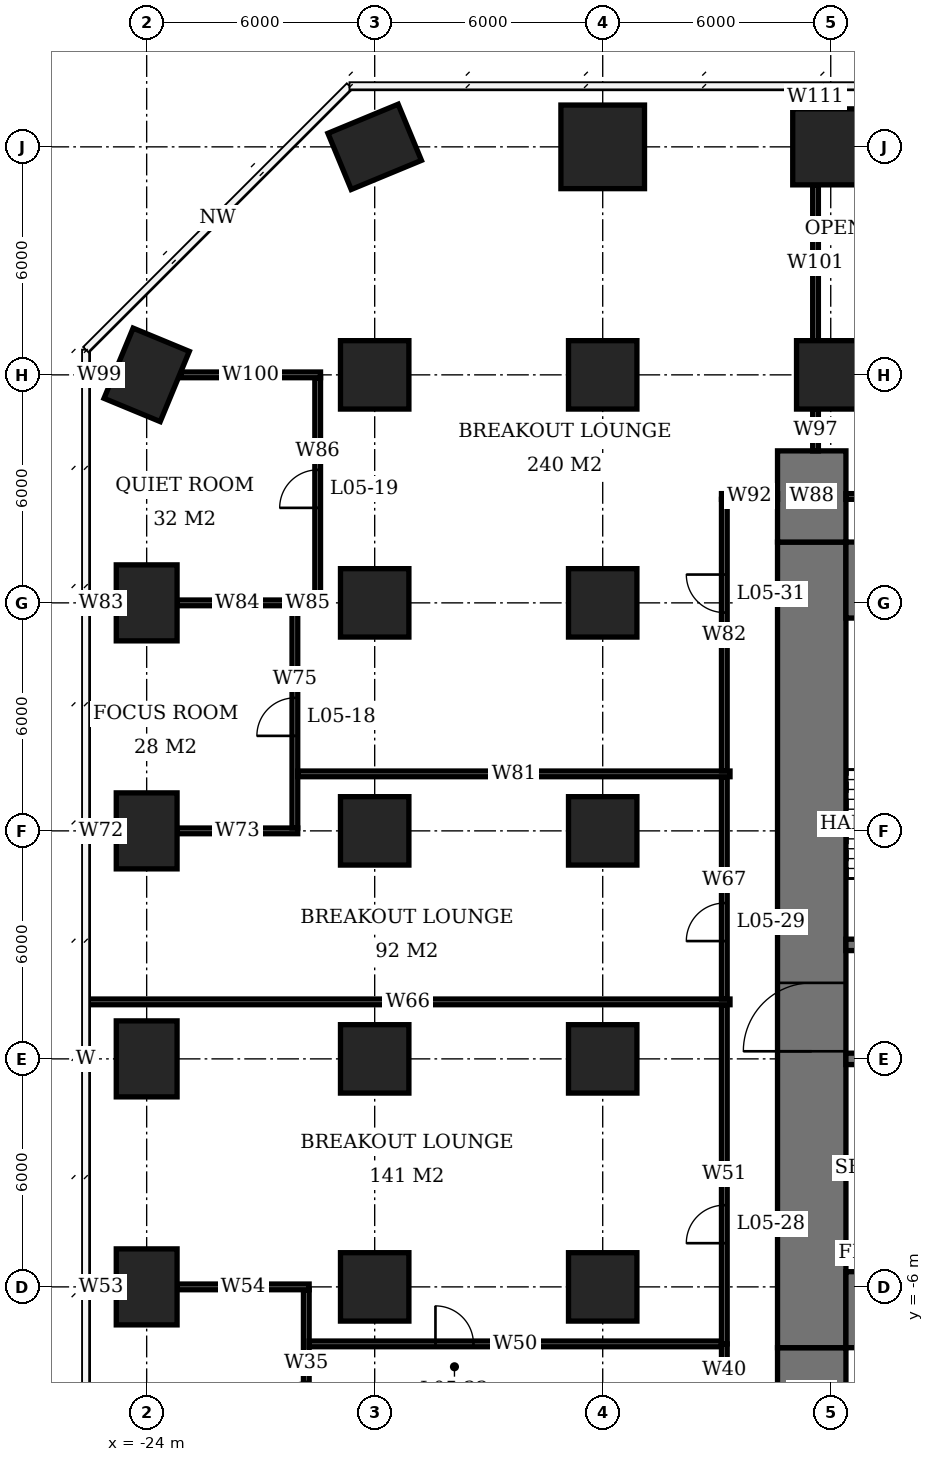
"""IFC4 building model, lengths in metres.
Left out: names, types, materials, properties, quantities, classifications, styles, units other than length and angle.
Written with IfcOpenShell. Run it as: python <this file> out.ifc"""

import sys

from ifc_helpers import new_model, si_unit, direction, frame, frame_2d, origin, origin_2d, place, context, subcontext, project, spatial, rectangle, extrude, element, fill, save


model = new_model("IFC4")
c1 = context("Model", 3, precision=1e-05, world=origin(), true_north=direction((0.0, 1.0)))
c2 = subcontext(c1, "Body", "Model", "MODEL_VIEW")
j1 = project(units=[si_unit("LENGTHUNIT", "METRE"), si_unit("PLANEANGLEUNIT", "RADIAN")], contexts=[c1])
p1 = place(None, origin())
s1 = spatial("IfcSite", under=j1, at=p1, CompositionType="ELEMENT")
p2 = place(p1, origin())
s2 = spatial("IfcBuilding", under=s1, at=p2, CompositionType="ELEMENT")
p3 = place(p2, frame((0.0, 0.0, 26.0)))
s3 = spatial("IfcBuildingStorey", under=s2, at=p3, CompositionType="ELEMENT", Elevation=26.0)
for number, where, z_axis, x_axis in (
    (1, (-24.0, -6.0, 0.0), (0.0, 0.0, 1.0), (0.0, 1.0, 0.0)),
    (2, (-24.0, 0.0, 0.0), (0.0, 0.0, 1.0), (0.0, 1.0, 0.0)),
    (3, (-24.0, 6.0, 0.0), (0.0, 0.0, 1.0), (0.0, 1.0, 0.0)),
    (4, (-24.0, 12.0, 0.0), (0.0, 0.0, 1.0), (0.0, 1.0, 0.0)),
    (5, (-24.0, 18.0, 0.0), (0.0, 0.0, 1.0), (0.383, 0.924, 0.0)),
):
    element("IfcColumn", number, at=place(p3, frame(where, z_axis=z_axis, x_axis=x_axis)), inside=s3, PredefinedType="COLUMN", context=c2, shape_type="SweptSolid", body=[
        extrude(rectangle(XDim=2.0, YDim=1.6, at=origin_2d()), origin(), (0.0, 0.0, 1.0), 3.9),
    ])
for number, where, z_axis, x_axis in (
    (6, (-18.0, -6.0, 0.0), (0.0, 0.0, 1.0), (1.0, 0.0, 0.0)),
    (7, (-18.0, 0.0, 0.0), (0.0, 0.0, 1.0), (1.0, 0.0, 0.0)),
    (8, (-18.0, 6.0, 0.0), (0.0, 0.0, 1.0), (1.0, 0.0, 0.0)),
    (9, (-18.0, 12.0, 0.0), (0.0, 0.0, 1.0), (1.0, 0.0, 0.0)),
    (10, (-18.0, 18.0, 0.0), (0.0, 0.0, 1.0), (1.0, 0.0, 0.0)),
):
    element("IfcColumn", number, at=place(p3, frame(where, z_axis=z_axis, x_axis=x_axis)), inside=s3, PredefinedType="COLUMN", context=c2, shape_type="SweptSolid", body=[
        extrude(rectangle(XDim=1.8, YDim=1.8, at=origin_2d()), origin(), (0.0, 0.0, 1.0), 3.9),
    ])
p4 = place(p3, frame((-18.0, 24.0, 0.0), z_axis=(0.0, 0.0, 1.0), x_axis=(0.923879532511, 0.382683432365, 0.0)))
e11 = element("IfcColumn", 11, at=p4, inside=s3, PredefinedType="COLUMN", context=c2, shape_type="SweptSolid", body=[
    extrude(rectangle(XDim=2.0, YDim=1.6, at=origin_2d()), origin(), (0.0, 0.0, 1.0), 3.9),
])
for number, where, z_axis, x_axis in (
    (12, (-12.0, -6.0, 0.0), (0.0, 0.0, 1.0), (1.0, 0.0, 0.0)),
    (13, (-12.0, 0.0, 0.0), (0.0, 0.0, 1.0), (1.0, 0.0, 0.0)),
    (14, (-12.0, 6.0, 0.0), (0.0, 0.0, 1.0), (1.0, 0.0, 0.0)),
    (15, (-12.0, 12.0, 0.0), (0.0, 0.0, 1.0), (1.0, 0.0, 0.0)),
    (16, (-12.0, 18.0, 0.0), (0.0, 0.0, 1.0), (1.0, 0.0, 0.0)),
):
    element("IfcColumn", number, at=place(p3, frame(where, z_axis=z_axis, x_axis=x_axis)), inside=s3, PredefinedType="COLUMN", context=c2, shape_type="SweptSolid", body=[
        extrude(rectangle(XDim=1.8, YDim=1.8, at=origin_2d()), origin(), (0.0, 0.0, 1.0), 3.9),
    ])
p5 = place(p3, frame((-12.0, 24.0, 0.0), z_axis=(0.0, 0.0, 1.0), x_axis=(1.0, 0.0, 0.0)))
e17 = element("IfcColumn", 17, at=p5, inside=s3, PredefinedType="COLUMN", context=c2, shape_type="SweptSolid", body=[
    extrude(rectangle(XDim=2.2, YDim=2.2, at=origin_2d()), origin(), (0.0, 0.0, 1.0), 3.9),
])
p6 = place(p3, frame((-6.0, 18.0, 0.0), z_axis=(0.0, 0.0, 1.0), x_axis=(1.0, 0.0, 0.0)))
e18 = element("IfcColumn", 18, at=p6, inside=s3, PredefinedType="COLUMN", context=c2, shape_type="SweptSolid", body=[
    extrude(rectangle(XDim=1.8, YDim=1.8, at=origin_2d()), origin(), (0.0, 0.0, 1.0), 3.9),
])
p7 = place(p3, frame((-6.0, 24.0, 0.0), z_axis=(0.0, 0.0, 1.0), x_axis=(1.0, 0.0, 0.0)))
e19 = element("IfcColumn", 19, at=p7, inside=s3, PredefinedType="COLUMN", context=c2, shape_type="SweptSolid", body=[
    extrude(rectangle(XDim=2.0, YDim=2.0, at=origin_2d()), origin(), (0.0, 0.0, 1.0), 3.9),
])
for number, where, z_axis, x_axis in (
    (20, (-5.6, -6.6, 0.0), (0.0, 0.0, 1.0), (1.0, 0.0, 0.0)),
    (21, (-5.6, 12.6, 0.0), (0.0, 0.0, 1.0), (1.0, 0.0, 0.0)),
):
    element("IfcWall", number, at=place(p3, frame(where, z_axis=z_axis, x_axis=x_axis)), inside=s3, PredefinedType="SHEAR", context=c2, shape_type="SweptSolid", body=[
        extrude(rectangle(XDim=23.2, YDim=2.0, at=frame_2d((11.6, 0.0))), origin(), (0.0, 0.0, 1.0), 3.9),
    ])
p8 = place(p3, frame((-6.5, -7.6, 0.0), z_axis=(0.0, 0.0, 1.0), x_axis=(0.0, 1.0, 0.0)))
e22 = element("IfcWall", 22, at=p8, inside=s3, PredefinedType="SHEAR", context=c2, shape_type="SweptSolid", body=[
    extrude(rectangle(XDim=21.2, YDim=1.8, at=frame_2d((10.6, 0.0))), origin(), (0.0, 0.0, 1.0), 3.9),
])
p9 = place(p8, frame((7.8, 0.0, 0.0)))
e23 = element("IfcOpeningElement", 23, at=p9, cuts=e22, PredefinedType="OPENING", context=c2, shape_type="SweptSolid", body=[
    extrude(rectangle(XDim=1.8, YDim=2.4, at=frame_2d((0.9, 1.2))), frame((0.0, 0.91, 0.0), z_axis=(0.0, -1.0, 0.0), x_axis=(1.0, 0.0, 0.0)), (0.0, 0.0, 1.0), 1.82),
])
for number, where, z_axis, x_axis in (
    (24, (-6.5, -10.0, 0.0), (0.0, 0.0, 1.0), (0.0, 1.0, 0.0)),
    (25, (-6.5, 13.6, 0.0), (0.0, 0.0, 1.0), (0.0, 1.0, 0.0)),
):
    element("IfcWall", number, at=place(p3, frame(where, z_axis=z_axis, x_axis=x_axis)), inside=s3, PredefinedType="SHEAR", context=c2, shape_type="SweptSolid", body=[
        extrude(rectangle(XDim=2.4, YDim=1.8, at=frame_2d((1.2, 0.0))), origin(), (0.0, 0.0, 1.0), 3.9),
    ])
p10 = place(p3, frame((-5.6, 0.0, 0.0), z_axis=(0.0, 0.0, 1.0), x_axis=(1.0, 0.0, 0.0)))
e26 = element("IfcWall", 26, at=p10, inside=s3, PredefinedType="SHEAR", context=c2, shape_type="SweptSolid", body=[
    extrude(rectangle(XDim=17.75, YDim=0.3, at=frame_2d((8.875, 0.0))), origin(), (0.0, 0.0, 1.0), 3.9),
])
p11 = place(p10, frame((0.6, 0.0, 0.0)))
e27 = element("IfcOpeningElement", 27, at=p11, cuts=e26, PredefinedType="OPENING", context=c2, shape_type="SweptSolid", body=[
    extrude(rectangle(XDim=0.9, YDim=2.1, at=frame_2d((0.45, 1.05))), frame((0.0, 0.16, 0.0), z_axis=(0.0, -1.0, 0.0), x_axis=(1.0, 0.0, 0.0)), (0.0, 0.0, 1.0), 0.32),
])
p12 = place(p10, frame((3.7, 0.0, 0.0)))
e28 = element("IfcOpeningElement", 28, at=p12, cuts=e26, PredefinedType="OPENING", context=c2, shape_type="SweptSolid", body=[
    extrude(rectangle(XDim=0.9, YDim=2.1, at=frame_2d((0.45, 1.05))), frame((0.0, 0.16, 0.0), z_axis=(0.0, -1.0, 0.0), x_axis=(1.0, 0.0, 0.0)), (0.0, 0.0, 1.0), 0.32),
])
p13 = place(p3, frame((-5.6, 3.0, 0.0), z_axis=(0.0, 0.0, 1.0), x_axis=(1.0, 0.0, 0.0)))
e29 = element("IfcWall", 29, at=p13, inside=s3, PredefinedType="SHEAR", context=c2, shape_type="SweptSolid", body=[
    extrude(rectangle(XDim=5.45, YDim=0.3, at=frame_2d((2.725, 0.0))), origin(), (0.0, 0.0, 1.0), 3.9),
])
p14 = place(p13, frame((0.4, 0.0, 0.0)))
e30 = element("IfcOpeningElement", 30, at=p14, cuts=e29, PredefinedType="OPENING", context=c2, shape_type="SweptSolid", body=[
    extrude(rectangle(XDim=1.2, YDim=2.1, at=frame_2d((0.6, 1.05))), frame((0.0, 0.16, 0.0), z_axis=(0.0, -1.0, 0.0), x_axis=(1.0, 0.0, 0.0)), (0.0, 0.0, 1.0), 0.32),
])
p15 = place(p13, frame((3.95, 0.0, 0.0)))
e31 = element("IfcOpeningElement", 31, at=p15, cuts=e29, PredefinedType="OPENING", context=c2, shape_type="SweptSolid", body=[
    extrude(rectangle(XDim=0.9, YDim=2.1, at=frame_2d((0.45, 1.05))), frame((0.0, 0.16, 0.0), z_axis=(0.0, -1.0, 0.0), x_axis=(1.0, 0.0, 0.0)), (0.0, 0.0, 1.0), 0.32),
])
p16 = place(p3, frame((-25.6, -6.0, 0.0), z_axis=(0.0, 0.0, 1.0), x_axis=(1.0, 0.0, 0.0)))
e32 = element("IfcWall", 32, at=p16, inside=s3, PredefinedType="PARTITIONING", context=c2, shape_type="SweptSolid", body=[
    extrude(rectangle(XDim=0.8, YDim=0.15, at=frame_2d((0.4, 0.0))), origin(), (0.0, 0.0, 1.0), 3.65),
])
p17 = place(p3, frame((-23.2, -6.0, 0.0), z_axis=(0.0, 0.0, 1.0), x_axis=(1.0, 0.0, 0.0)))
e33 = element("IfcWall", 33, at=p17, inside=s3, PredefinedType="PARTITIONING", context=c2, shape_type="SweptSolid", body=[
    extrude(rectangle(XDim=3.475, YDim=0.15, at=frame_2d((1.737, 0.0))), origin(), (0.0, 0.0, 1.0), 3.65),
])
p18 = place(p3, frame((-25.6, 6.0, 0.0), z_axis=(0.0, 0.0, 1.0), x_axis=(1.0, 0.0, 0.0)))
e34 = element("IfcWall", 34, at=p18, inside=s3, PredefinedType="PARTITIONING", context=c2, shape_type="SweptSolid", body=[
    extrude(rectangle(XDim=0.8, YDim=0.15, at=frame_2d((0.4, 0.0))), origin(), (0.0, 0.0, 1.0), 3.65),
])
p19 = place(p3, frame((-23.2, 6.0, 0.0), z_axis=(0.0, 0.0, 1.0), x_axis=(1.0, 0.0, 0.0)))
e35 = element("IfcWall", 35, at=p19, inside=s3, PredefinedType="PARTITIONING", context=c2, shape_type="SweptSolid", body=[
    extrude(rectangle(XDim=3.175, YDim=0.15, at=frame_2d((1.587, 0.0))), origin(), (0.0, 0.0, 1.0), 3.65),
])
p20 = place(p3, frame((-25.6, 12.0, 0.0), z_axis=(0.0, 0.0, 1.0), x_axis=(1.0, 0.0, 0.0)))
e36 = element("IfcWall", 36, at=p20, inside=s3, PredefinedType="PARTITIONING", context=c2, shape_type="SweptSolid", body=[
    extrude(rectangle(XDim=0.8, YDim=0.15, at=frame_2d((0.4, 0.0))), origin(), (0.0, 0.0, 1.0), 3.65),
])
p21 = place(p3, frame((-23.2, 12.0, 0.0), z_axis=(0.0, 0.0, 1.0), x_axis=(1.0, 0.0, 0.0)))
e37 = element("IfcWall", 37, at=p21, inside=s3, PredefinedType="PARTITIONING", context=c2, shape_type="SweptSolid", body=[
    extrude(rectangle(XDim=3.175, YDim=0.15, at=frame_2d((1.587, 0.0))), origin(), (0.0, 0.0, 1.0), 3.65),
])
p22 = place(p3, frame((-20.1, 12.0, 0.0), z_axis=(0.0, 0.0, 1.0), x_axis=(1.0, 0.0, 0.0)))
e38 = element("IfcWall", 38, at=p22, inside=s3, PredefinedType="PARTITIONING", context=c2, shape_type="SweptSolid", body=[
    extrude(rectangle(XDim=0.675, YDim=0.15, at=frame_2d((0.337, 0.0))), origin(), (0.0, 0.0, 1.0), 3.65),
])
p23 = place(p3, frame((-25.6, 18.0, 0.0), z_axis=(0.0, 0.0, 1.0), x_axis=(1.0, 0.0, 0.0)))
e39 = element("IfcWall", 39, at=p23, inside=s3, PredefinedType="PARTITIONING", context=c2, shape_type="SweptSolid", body=[
    extrude(rectangle(XDim=0.703, YDim=0.15, at=frame_2d((0.352, 0.0))), origin(), (0.0, 0.0, 1.0), 3.65),
])
p24 = place(p3, frame((-23.103, 18.0, 0.0), z_axis=(0.0, 0.0, 1.0), x_axis=(1.0, 0.0, 0.0)))
e40 = element("IfcWall", 40, at=p24, inside=s3, PredefinedType="PARTITIONING", context=c2, shape_type="SweptSolid", body=[
    extrude(rectangle(XDim=3.678, YDim=0.15, at=frame_2d((1.839, 0.0))), origin(), (0.0, 0.0, 1.0), 3.65),
])
p25 = place(p3, frame((-20.1, 6.075, 0.0), z_axis=(0.0, 0.0, 1.0), x_axis=(0.0, 1.0, 0.0)))
e41 = element("IfcWall", 41, at=p25, inside=s3, PredefinedType="PARTITIONING", context=c2, shape_type="SweptSolid", body=[
    extrude(rectangle(XDim=5.85, YDim=0.15, at=frame_2d((2.925, 0.0))), origin(), (0.0, 0.0, 1.0), 3.65),
])
p26 = place(p25, frame((2.425, 0.0, 0.0)))
e42 = element("IfcOpeningElement", 42, at=p26, cuts=e41, PredefinedType="OPENING", context=c2, shape_type="SweptSolid", body=[
    extrude(rectangle(XDim=1.0, YDim=2.1, at=frame_2d((0.5, 1.05))), frame((0.0, 0.085, 0.0), z_axis=(0.0, -1.0, 0.0), x_axis=(1.0, 0.0, 0.0)), (0.0, 0.0, 1.0), 0.17),
])
p27 = place(p3, frame((-19.8, -11.925, 0.0), z_axis=(0.0, 0.0, 1.0), x_axis=(0.0, 1.0, 0.0)))
e43 = element("IfcWall", 43, at=p27, inside=s3, PredefinedType="PARTITIONING", context=c2, shape_type="SweptSolid", body=[
    extrude(rectangle(XDim=5.85, YDim=0.15, at=frame_2d((2.925, 0.0))), origin(), (0.0, 0.0, 1.0), 3.65),
])
p28 = place(p27, frame((2.425, 0.0, 0.0)))
e44 = element("IfcOpeningElement", 44, at=p28, cuts=e43, PredefinedType="OPENING", context=c2, shape_type="SweptSolid", body=[
    extrude(rectangle(XDim=1.0, YDim=2.1, at=frame_2d((0.5, 1.05))), frame((0.0, 0.085, 0.0), z_axis=(0.0, -1.0, 0.0), x_axis=(1.0, 0.0, 0.0)), (0.0, 0.0, 1.0), 0.17),
])
p29 = place(p3, frame((-19.5, 12.075, 0.0), z_axis=(0.0, 0.0, 1.0), x_axis=(0.0, 1.0, 0.0)))
e45 = element("IfcWall", 45, at=p29, inside=s3, PredefinedType="PARTITIONING", context=c2, shape_type="SweptSolid", body=[
    extrude(rectangle(XDim=5.85, YDim=0.15, at=frame_2d((2.925, 0.0))), origin(), (0.0, 0.0, 1.0), 3.65),
])
p30 = place(p29, frame((2.425, 0.0, 0.0)))
e46 = element("IfcOpeningElement", 46, at=p30, cuts=e45, PredefinedType="OPENING", context=c2, shape_type="SweptSolid", body=[
    extrude(rectangle(XDim=1.0, YDim=2.1, at=frame_2d((0.5, 1.05))), frame((0.0, 0.085, 0.0), z_axis=(0.0, -1.0, 0.0), x_axis=(1.0, 0.0, 0.0)), (0.0, 0.0, 1.0), 0.17),
])
p31 = place(p3, frame((-25.6, 1.5, 0.0), z_axis=(0.0, 0.0, 1.0), x_axis=(1.0, 0.0, 0.0)))
e47 = element("IfcWall", 47, at=p31, inside=s3, PredefinedType="PARTITIONING", context=c2, shape_type="SweptSolid", body=[
    extrude(rectangle(XDim=16.95, YDim=0.15, at=frame_2d((8.475, 0.0))), origin(), (0.0, 0.0, 1.0), 3.65),
])
p32 = place(p3, frame((-20.025, 7.5, 0.0), z_axis=(0.0, 0.0, 1.0), x_axis=(1.0, 0.0, 0.0)))
e48 = element("IfcWall", 48, at=p32, inside=s3, PredefinedType="PARTITIONING", context=c2, shape_type="SweptSolid", body=[
    extrude(rectangle(XDim=11.375, YDim=0.15, at=frame_2d((5.688, 0.0))), origin(), (0.0, 0.0, 1.0), 3.65),
])
p33 = place(p3, frame((-19.725, -7.5, 0.0), z_axis=(0.0, 0.0, 1.0), x_axis=(1.0, 0.0, 0.0)))
e49 = element("IfcWall", 49, at=p33, inside=s3, PredefinedType="PARTITIONING", context=c2, shape_type="SweptSolid", body=[
    extrude(rectangle(XDim=10.85, YDim=0.15, at=frame_2d((5.425, 0.0))), origin(), (0.0, 0.0, 1.0), 3.65),
])
p34 = place(p33, frame((3.324, 0.0, 0.0)))
e50 = element("IfcOpeningElement", 50, at=p34, cuts=e49, PredefinedType="OPENING", context=c2, shape_type="SweptSolid", body=[
    extrude(rectangle(XDim=1.0, YDim=2.1, at=frame_2d((0.5, 1.05))), frame((0.0, 0.085, 0.0), z_axis=(0.0, -1.0, 0.0), x_axis=(1.0, 0.0, 0.0)), (0.0, 0.0, 1.0), 0.17),
])
p35 = place(p3, frame((-8.8, -8.875, 0.0), z_axis=(0.0, 0.0, 1.0), x_axis=(0.0, 1.0, 0.0)))
e51 = element("IfcWall", 51, at=p35, inside=s3, PredefinedType="PARTITIONING", context=c2, shape_type="SweptSolid", body=[
    extrude(rectangle(XDim=1.375, YDim=0.15, at=frame_2d((0.688, 0.0))), origin(), (0.0, 0.0, 1.0), 3.65),
])
p36 = place(p3, frame((-8.8, -7.5, 0.0), z_axis=(0.0, 0.0, 1.0), x_axis=(0.0, 1.0, 0.0)))
e52 = element("IfcWall", 52, at=p36, inside=s3, PredefinedType="PARTITIONING", context=c2, shape_type="SweptSolid", body=[
    extrude(rectangle(XDim=8.925, YDim=0.15, at=frame_2d((4.462, 0.0))), origin(), (0.0, 0.0, 1.0), 3.65),
])
p37 = place(p36, frame((2.65, 0.0, 0.0)))
e53 = element("IfcOpeningElement", 53, at=p37, cuts=e52, PredefinedType="OPENING", context=c2, shape_type="SweptSolid", body=[
    extrude(rectangle(XDim=1.0, YDim=2.1, at=frame_2d((0.5, 1.05))), frame((0.0, 0.085, 0.0), z_axis=(0.0, -1.0, 0.0), x_axis=(1.0, 0.0, 0.0)), (0.0, 0.0, 1.0), 0.17),
])
p38 = place(p3, frame((-8.8, 1.575, 0.0), z_axis=(0.0, 0.0, 1.0), x_axis=(0.0, 1.0, 0.0)))
e54 = element("IfcWall", 54, at=p38, inside=s3, PredefinedType="PARTITIONING", context=c2, shape_type="SweptSolid", body=[
    extrude(rectangle(XDim=5.85, YDim=0.15, at=frame_2d((2.925, 0.0))), origin(), (0.0, 0.0, 1.0), 3.65),
])
p39 = place(p38, frame((1.525, 0.0, 0.0)))
e55 = element("IfcOpeningElement", 55, at=p39, cuts=e54, PredefinedType="OPENING", context=c2, shape_type="SweptSolid", body=[
    extrude(rectangle(XDim=1.0, YDim=2.1, at=frame_2d((0.5, 1.05))), frame((0.0, 0.085, 0.0), z_axis=(0.0, -1.0, 0.0), x_axis=(1.0, 0.0, 0.0)), (0.0, 0.0, 1.0), 0.17),
])
p40 = place(p3, frame((-8.8, 7.575, 0.0), z_axis=(0.0, 0.0, 1.0), x_axis=(0.0, 1.0, 0.0)))
e56 = element("IfcWall", 56, at=p40, inside=s3, PredefinedType="PARTITIONING", context=c2, shape_type="SweptSolid", body=[
    extrude(rectangle(XDim=7.15, YDim=0.15, at=frame_2d((3.575, 0.0))), origin(), (0.0, 0.0, 1.0), 3.65),
])
p41 = place(p40, frame((4.17, 0.0, 0.0)))
e57 = element("IfcOpeningElement", 57, at=p41, cuts=e56, PredefinedType="OPENING", context=c2, shape_type="SweptSolid", body=[
    extrude(rectangle(XDim=1.0, YDim=2.1, at=frame_2d((0.5, 1.05))), frame((0.0, 0.085, 0.0), z_axis=(0.0, -1.0, 0.0), x_axis=(1.0, 0.0, 0.0)), (0.0, 0.0, 1.0), 0.17),
])
p42 = place(p3, frame((-8.875, 14.8, 0.0), z_axis=(0.0, 0.0, 1.0), x_axis=(1.0, 0.0, 0.0)))
e58 = element("IfcWall", 58, at=p42, inside=s3, PredefinedType="PARTITIONING", context=c2, shape_type="SweptSolid", body=[
    extrude(rectangle(XDim=1.475, YDim=0.15, at=frame_2d((0.738, 0.0))), origin(), (0.0, 0.0, 1.0), 3.65),
])
p43 = place(p3, frame((-6.4, 16.0, 0.0), z_axis=(0.0, 0.0, 1.0), x_axis=(0.0, 1.0, 0.0)))
e59 = element("IfcWall", 59, at=p43, inside=s3, PredefinedType="PARTITIONING", context=c2, shape_type="SweptSolid", body=[
    extrude(rectangle(XDim=1.1, YDim=0.15, at=frame_2d((0.55, 0.0))), origin(), (0.0, 0.0, 1.0), 3.65),
])
p44 = place(p3, frame((-6.4, 18.9, 0.0), z_axis=(0.0, 0.0, 1.0), x_axis=(0.0, 1.0, 0.0)))
e60 = element("IfcWall", 60, at=p44, inside=s3, PredefinedType="PARTITIONING", context=c2, shape_type="SweptSolid", body=[
    extrude(rectangle(XDim=4.1, YDim=0.15, at=frame_2d((2.05, 0.0))), origin(), (0.0, 0.0, 1.0), 3.65),
])
p45 = place(p3, frame((-6.4, 25.0, 0.0), z_axis=(0.0, 0.0, 1.0), x_axis=(0.0, 1.0, 0.0)))
e61 = element("IfcWall", 61, at=p45, inside=s3, PredefinedType="PARTITIONING", context=c2, shape_type="SweptSolid", body=[
    extrude(rectangle(XDim=0.6, YDim=0.15, at=frame_2d((0.3, 0.0))), origin(), (0.0, 0.0, 1.0), 3.65),
])
p46 = place(p3, frame((-5.6, 14.8, 0.0), z_axis=(0.0, 0.0, 1.0), x_axis=(1.0, 0.0, 0.0)))
e62 = element("IfcWall", 62, at=p46, inside=s3, PredefinedType="PARTITIONING", context=c2, shape_type="SweptSolid", body=[
    extrude(rectangle(XDim=4.025, YDim=0.15, at=frame_2d((2.013, 0.0))), origin(), (0.0, 0.0, 1.0), 3.65),
])
p47 = place(p46, frame((2.165, 0.0, 0.0)))
e63 = element("IfcOpeningElement", 63, at=p47, cuts=e62, PredefinedType="OPENING", context=c2, shape_type="SweptSolid", body=[
    extrude(rectangle(XDim=1.0, YDim=2.1, at=frame_2d((0.5, 1.05))), frame((0.0, 0.085, 0.0), z_axis=(0.0, -1.0, 0.0), x_axis=(1.0, 0.0, 0.0)), (0.0, 0.0, 1.0), 0.17),
])
p48 = place(p9, origin())
e64 = element("IfcDoor", 64, at=p48, inside=s3, OperationType="DOUBLE_DOOR_SINGLE_SWING", PredefinedType="DOOR", context=c2, shape_type="SweptSolid", body=[
    extrude(rectangle(XDim=1.8, YDim=2.4, at=frame_2d((0.9, 1.2))), frame((0.0, 0.025, 0.0), z_axis=(0.0, -1.0, 0.0), x_axis=(1.0, 0.0, 0.0)), (0.0, 0.0, 1.0), 0.05),
])
fill(e23, e64)
p49 = place(p26, origin())
e65 = element("IfcDoor", 65, at=p49, inside=s3, OperationType="SINGLE_SWING_LEFT", PredefinedType="DOOR", context=c2, shape_type="SweptSolid", body=[
    extrude(rectangle(XDim=1.0, YDim=2.1, at=frame_2d((0.5, 1.05))), frame((0.0, 0.025, 0.0), z_axis=(0.0, -1.0, 0.0), x_axis=(1.0, 0.0, 0.0)), (0.0, 0.0, 1.0), 0.05),
])
fill(e42, e65)
p50 = place(p30, origin())
e66 = element("IfcDoor", 66, at=p50, inside=s3, OperationType="SINGLE_SWING_LEFT", PredefinedType="DOOR", context=c2, shape_type="SweptSolid", body=[
    extrude(rectangle(XDim=1.0, YDim=2.1, at=frame_2d((0.5, 1.05))), frame((0.0, 0.025, 0.0), z_axis=(0.0, -1.0, 0.0), x_axis=(1.0, 0.0, 0.0)), (0.0, 0.0, 1.0), 0.05),
])
fill(e46, e66)
p51 = place(p34, origin())
e67 = element("IfcDoor", 67, at=p51, inside=s3, OperationType="SINGLE_SWING_LEFT", PredefinedType="DOOR", context=c2, shape_type="SweptSolid", body=[
    extrude(rectangle(XDim=1.0, YDim=2.1, at=frame_2d((0.5, 1.05))), frame((0.0, 0.025, 0.0), z_axis=(0.0, -1.0, 0.0), x_axis=(1.0, 0.0, 0.0)), (0.0, 0.0, 1.0), 0.05),
])
fill(e50, e67)
p52 = place(p37, origin())
e68 = element("IfcDoor", 68, at=p52, inside=s3, OperationType="SINGLE_SWING_LEFT", PredefinedType="DOOR", context=c2, shape_type="SweptSolid", body=[
    extrude(rectangle(XDim=1.0, YDim=2.1, at=frame_2d((0.5, 1.05))), frame((0.0, 0.025, 0.0), z_axis=(0.0, -1.0, 0.0), x_axis=(1.0, 0.0, 0.0)), (0.0, 0.0, 1.0), 0.05),
])
fill(e53, e68)
p53 = place(p39, origin())
e69 = element("IfcDoor", 69, at=p53, inside=s3, OperationType="SINGLE_SWING_LEFT", PredefinedType="DOOR", context=c2, shape_type="SweptSolid", body=[
    extrude(rectangle(XDim=1.0, YDim=2.1, at=frame_2d((0.5, 1.05))), frame((0.0, 0.025, 0.0), z_axis=(0.0, -1.0, 0.0), x_axis=(1.0, 0.0, 0.0)), (0.0, 0.0, 1.0), 0.05),
])
fill(e55, e69)
p54 = place(p41, origin())
e70 = element("IfcDoor", 70, at=p54, inside=s3, OperationType="SINGLE_SWING_RIGHT", PredefinedType="DOOR", context=c2, shape_type="SweptSolid", body=[
    extrude(rectangle(XDim=1.0, YDim=2.1, at=frame_2d((0.5, 1.05))), frame((0.0, 0.025, 0.0), z_axis=(0.0, -1.0, 0.0), x_axis=(1.0, 0.0, 0.0)), (0.0, 0.0, 1.0), 0.05),
])
fill(e57, e70)
save(model, sys.argv[1])
